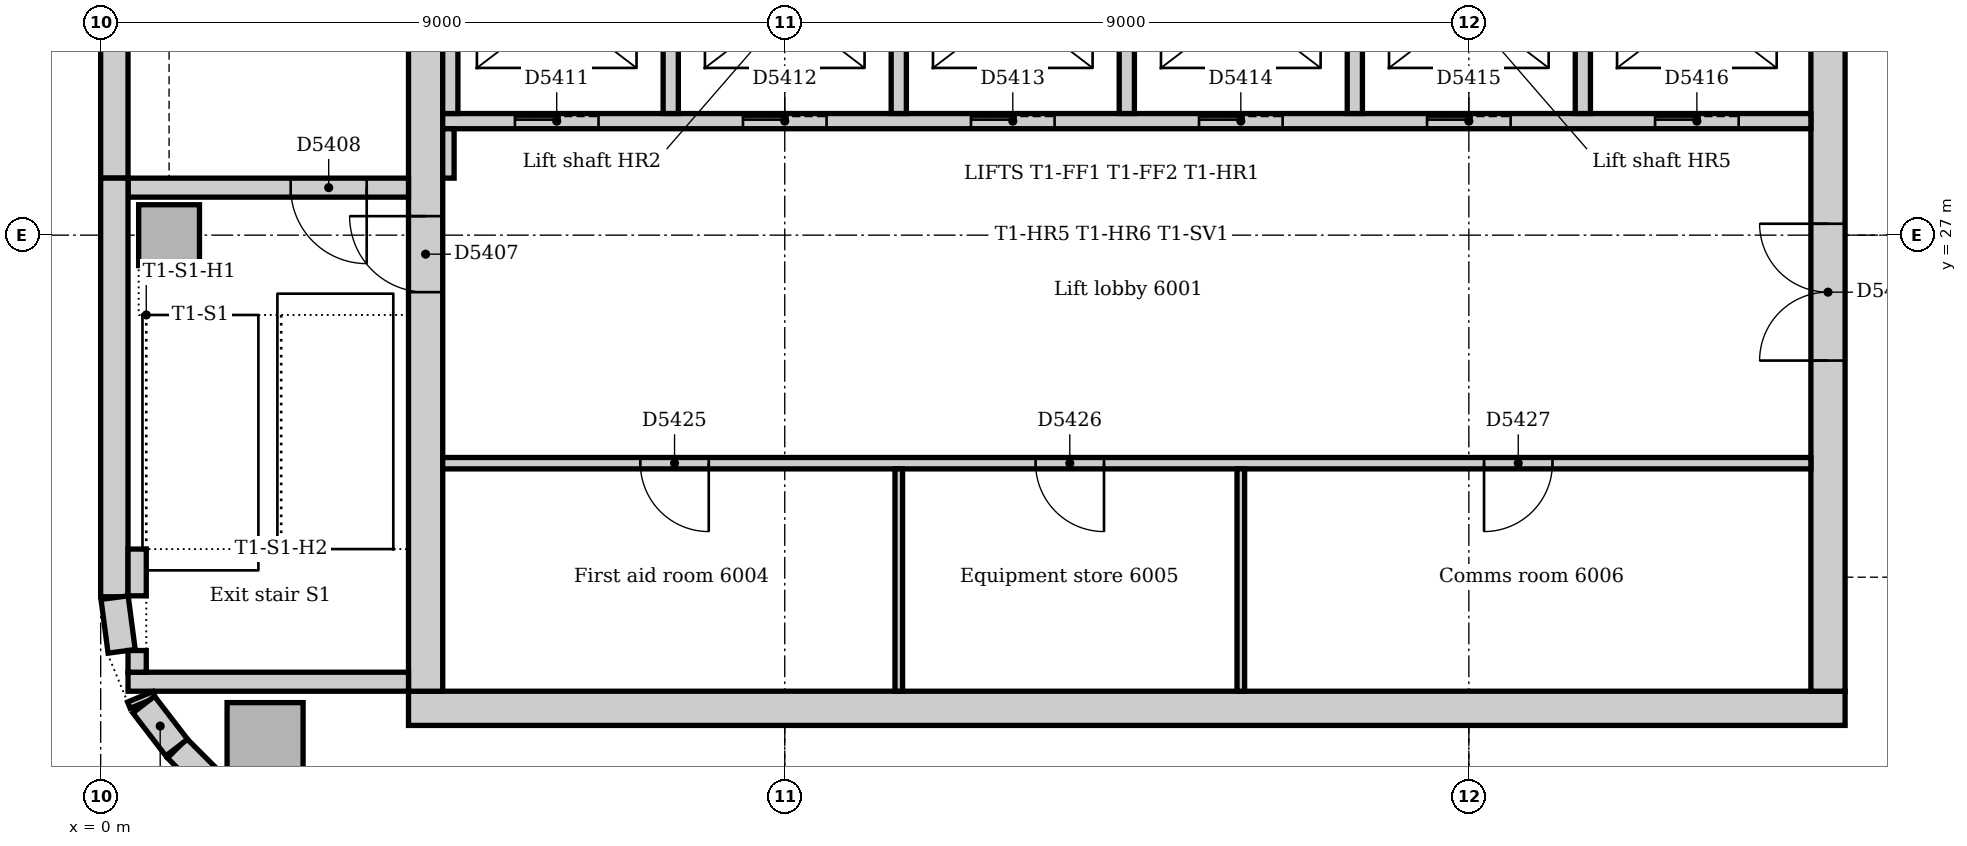
"""IFC4 building model, lengths in metres.
Left out: names, types, materials, properties, quantities, classifications, styles, units other than length and angle.
Written with IfcOpenShell. Run it as: python <this file> out.ifc"""

import sys

from ifc_helpers import new_model, si_unit, direction, frame, frame_2d, origin, origin_2d, place, context, subcontext, project, spatial, rectangle, extrude, element, fill, save


model = new_model("IFC4")
c1 = context("Model", 3, precision=1e-05, world=origin(), true_north=direction((0.0, 1.0)))
c2 = subcontext(c1, "Body", "Model", "MODEL_VIEW")
j1 = project(units=[si_unit("LENGTHUNIT", "METRE"), si_unit("PLANEANGLEUNIT", "RADIAN")], contexts=[c1])
p1 = place(None, origin())
s1 = spatial("IfcSite", under=j1, at=p1, CompositionType="ELEMENT")
p2 = place(p1, origin())
s2 = spatial("IfcBuilding", under=s1, at=p2, CompositionType="ELEMENT")
p3 = place(p2, frame((0.0, 0.0, 251.0)))
s3 = spatial("IfcBuildingStorey", under=s2, at=p3, CompositionType="ELEMENT", Elevation=251.0)
p4 = place(p3, frame((4.05, 20.775, 0.0), z_axis=(0.0, 0.0, 1.0), x_axis=(1.0, 0.0, 0.0)))
e1 = element("IfcWall", 1, at=p4, inside=s3, PredefinedType="SOLIDWALL", context=c2, shape_type="SweptSolid", body=[
    extrude(rectangle(XDim=18.9, YDim=0.45, at=frame_2d((9.45, 0.0))), origin(), (0.0, 0.0, 1.0), 4.0),
])
p5 = place(p3, frame((22.725, 21.0, 0.0), z_axis=(0.0, 0.0, 1.0), x_axis=(0.0, 1.0, 0.0)))
e2 = element("IfcWall", 2, at=p5, inside=s3, PredefinedType="SOLIDWALL", context=c2, shape_type="SweptSolid", body=[
    extrude(rectangle(XDim=10.5, YDim=0.45, at=frame_2d((5.25, 0.0))), origin(), (0.0, 0.0, 1.0), 4.0),
])
p6 = place(p5, frame((4.35, 0.0, 0.0)))
e3 = element("IfcOpeningElement", 3, at=p6, cuts=e2, PredefinedType="OPENING", context=c2, shape_type="SweptSolid", body=[
    extrude(rectangle(XDim=1.8, YDim=2.1, at=frame_2d((0.9, 1.05))), frame((0.0, 0.235, 0.0), z_axis=(0.0, -1.0, 0.0), x_axis=(1.0, 0.0, 0.0)), (0.0, 0.0, 1.0), 0.47),
])
p7 = place(p3, frame((4.275, 31.5, 0.0), z_axis=(0.0, 0.0, 1.0), x_axis=(0.0, -1.0, 0.0)))
e4 = element("IfcWall", 4, at=p7, inside=s3, PredefinedType="SOLIDWALL", context=c2, shape_type="SweptSolid", body=[
    extrude(rectangle(XDim=10.5, YDim=0.45, at=frame_2d((5.25, 0.0))), origin(), (0.0, 0.0, 1.0), 4.0),
])
p8 = place(p7, frame((4.25, 0.0, 0.0)))
e5 = element("IfcOpeningElement", 5, at=p8, cuts=e4, PredefinedType="OPENING", context=c2, shape_type="SweptSolid", body=[
    extrude(rectangle(XDim=1.0, YDim=2.1, at=frame_2d((0.5, 1.05))), frame((0.0, 0.235, 0.0), z_axis=(0.0, -1.0, 0.0), x_axis=(1.0, 0.0, 0.0)), (0.0, 0.0, 1.0), 0.47),
])
p9 = place(p3, frame((0.36, 21.125, 0.0), z_axis=(0.0, 0.0, 1.0), x_axis=(1.0, 0.0, 0.0)))
e6 = element("IfcWall", 6, at=p9, inside=s3, PredefinedType="SOLIDWALL", context=c2, shape_type="SweptSolid", body=[
    extrude(rectangle(XDim=3.69, YDim=0.25, at=frame_2d((1.845, 0.0))), origin(), (0.0, 0.0, 1.0), 4.0),
])
p10 = place(p3, frame((4.05, 27.625, 0.0), z_axis=(0.0, 0.0, 1.0), x_axis=(-1.0, 0.0, 0.0)))
e7 = element("IfcWall", 7, at=p10, inside=s3, PredefinedType="SOLIDWALL", context=c2, shape_type="SweptSolid", body=[
    extrude(rectangle(XDim=3.69, YDim=0.25, at=frame_2d((1.845, 0.0))), origin(), (0.0, 0.0, 1.0), 4.0),
])
p11 = place(p10, frame((0.55, 0.0, 0.0)))
e8 = element("IfcOpeningElement", 8, at=p11, cuts=e7, PredefinedType="OPENING", context=c2, shape_type="SweptSolid", body=[
    extrude(rectangle(XDim=1.0, YDim=2.1, at=frame_2d((0.5, 1.05))), frame((0.0, 0.135, 0.0), z_axis=(0.0, -1.0, 0.0), x_axis=(1.0, 0.0, 0.0)), (0.0, 0.0, 1.0), 0.27),
])
p12 = place(p3, frame((2.163, 20.35, 0.0), z_axis=(0.0, 0.0, 1.0), x_axis=(1.0, 0.0, 0.0)))
e9 = element("IfcColumn", 9, at=p12, inside=s3, PredefinedType="COLUMN", context=c2, shape_type="SweptSolid", body=[
    extrude(rectangle(XDim=1.0, YDim=1.0, at=origin_2d()), origin(), (0.0, 0.0, 1.0), 3.85),
])
p13 = place(p3, frame((0.9, 27.0, 0.0), z_axis=(0.0, 0.0, 1.0), x_axis=(1.0, 0.0, 0.0)))
e10 = element("IfcColumn", 10, at=p13, inside=s3, PredefinedType="COLUMN", context=c2, shape_type="SweptSolid", body=[
    extrude(rectangle(XDim=0.8, YDim=0.8, at=origin_2d()), origin(), (0.0, 0.0, 1.0), 4.0),
])
p14 = place(p3, frame((0.18, 35.25, 0.0), z_axis=(0.0, 0.0, 1.0), x_axis=(0.0, -1.0, 0.0)))
e11 = element("IfcWall", 11, at=p14, inside=s3, PredefinedType="STANDARD", context=c2, shape_type="SweptSolid", body=[
    extrude(rectangle(XDim=7.5, YDim=0.36, at=frame_2d((3.75, 0.0))), origin(), (0.0, 0.0, 1.0), 3.85),
])
p15 = place(p3, frame((0.18, 27.75, 0.0), z_axis=(0.0, 0.0, 1.0), x_axis=(0.0, -1.0, 0.0)))
e12 = element("IfcWall", 12, at=p15, inside=s3, PredefinedType="STANDARD", context=c2, shape_type="SweptSolid", body=[
    extrude(rectangle(XDim=5.507, YDim=0.36, at=frame_2d((2.754, 0.0))), origin(), (0.0, 0.0, 1.0), 3.85),
])
p16 = place(p3, frame((1.006, 20.249, 0.0), z_axis=(0.0, 0.0, 1.0), x_axis=(0.707106781187, -0.707106781187, 0.0)))
e13 = element("IfcWall", 13, at=p16, inside=s3, PredefinedType="STANDARD", context=c2, shape_type="SweptSolid", body=[
    extrude(rectangle(XDim=1.757, YDim=0.36, at=frame_2d((0.879, 0.0))), origin(), (0.0, 0.0, 1.0), 3.85),
])
p17 = place(p3, frame((0.183, 22.231, 0.0), z_axis=(0.0, 0.0, 1.0), x_axis=(0.13055608231, -0.99144092581, 0.0)))
e14 = element("IfcWall", 14, at=p17, inside=s3, PredefinedType="STANDARD", context=c2, shape_type="SweptSolid", body=[
    extrude(rectangle(XDim=0.713, YDim=0.36, at=frame_2d((0.356, 0.0))), origin(), (0.0, 0.0, 1.0), 3.85),
])
p18 = place(p3, frame((0.521, 20.927, 0.0), z_axis=(0.0, 0.0, 1.0), x_axis=(0.382549378284, -0.923935048136, 0.0)))
e15 = element("IfcWall", 15, at=p18, inside=s3, PredefinedType="STANDARD", context=c2, shape_type="SweptSolid", body=[
    extrude(rectangle(XDim=0.089, YDim=0.36, at=frame_2d((0.045, 0.0))), origin(), (0.0, 0.0, 1.0), 3.85),
])
p19 = place(p3, frame((0.566, 20.825, 0.0), z_axis=(0.0, 0.0, 1.0), x_axis=(0.608802368033, -0.793321924995, 0.0)))
e16 = element("IfcWall", 16, at=p19, inside=s3, PredefinedType="STANDARD", context=c2, shape_type="SweptSolid", body=[
    extrude(rectangle(XDim=0.713, YDim=0.36, at=frame_2d((0.357, 0.0))), origin(), (0.0, 0.0, 1.0), 3.85),
])
p20 = place(p3, frame((0.48, 21.25, 0.0), z_axis=(0.0, 0.0, 1.0), x_axis=(0.0, 1.0, 0.0)))
e17 = element("IfcWall", 17, at=p20, inside=s3, PredefinedType="STANDARD", context=c2, shape_type="SweptSolid", body=[
    extrude(rectangle(XDim=0.285, YDim=0.24, at=frame_2d((0.143, 0.0))), origin(), (0.0, 0.0, 1.0), 4.0),
])
p21 = place(p3, frame((0.48, 22.255, 0.0), z_axis=(0.0, 0.0, 1.0), x_axis=(0.0, 1.0, 0.0)))
e18 = element("IfcWall", 18, at=p21, inside=s3, PredefinedType="STANDARD", context=c2, shape_type="SweptSolid", body=[
    extrude(rectangle(XDim=0.615, YDim=0.24, at=frame_2d((0.307, 0.0))), origin(), (0.0, 0.0, 1.0), 4.0),
])
p22 = place(p3, frame((4.5, 28.5, 0.0), z_axis=(0.0, 0.0, 1.0), x_axis=(1.0, 0.0, 0.0)))
e19 = element("IfcWall", 19, at=p22, inside=s3, PredefinedType="PARTITIONING", context=c2, shape_type="SweptSolid", body=[
    extrude(rectangle(XDim=18.0, YDim=0.2, at=frame_2d((9.0, 0.0))), origin(), (0.0, 0.0, 1.0), 3.85),
])
p23 = place(p22, frame((0.95, 0.0, 0.0)))
e20 = element("IfcOpeningElement", 20, at=p23, cuts=e19, PredefinedType="OPENING", context=c2, shape_type="SweptSolid", body=[
    extrude(rectangle(XDim=1.1, YDim=2.1, at=frame_2d((0.55, 1.05))), frame((0.0, 0.11, 0.0), z_axis=(0.0, -1.0, 0.0), x_axis=(1.0, 0.0, 0.0)), (0.0, 0.0, 1.0), 0.22),
])
p24 = place(p22, frame((3.95, 0.0, 0.0)))
e21 = element("IfcOpeningElement", 21, at=p24, cuts=e19, PredefinedType="OPENING", context=c2, shape_type="SweptSolid", body=[
    extrude(rectangle(XDim=1.1, YDim=2.1, at=frame_2d((0.55, 1.05))), frame((0.0, 0.11, 0.0), z_axis=(0.0, -1.0, 0.0), x_axis=(1.0, 0.0, 0.0)), (0.0, 0.0, 1.0), 0.22),
])
p25 = place(p22, frame((6.95, 0.0, 0.0)))
e22 = element("IfcOpeningElement", 22, at=p25, cuts=e19, PredefinedType="OPENING", context=c2, shape_type="SweptSolid", body=[
    extrude(rectangle(XDim=1.1, YDim=2.1, at=frame_2d((0.55, 1.05))), frame((0.0, 0.11, 0.0), z_axis=(0.0, -1.0, 0.0), x_axis=(1.0, 0.0, 0.0)), (0.0, 0.0, 1.0), 0.22),
])
p26 = place(p22, frame((9.95, 0.0, 0.0)))
e23 = element("IfcOpeningElement", 23, at=p26, cuts=e19, PredefinedType="OPENING", context=c2, shape_type="SweptSolid", body=[
    extrude(rectangle(XDim=1.1, YDim=2.1, at=frame_2d((0.55, 1.05))), frame((0.0, 0.11, 0.0), z_axis=(0.0, -1.0, 0.0), x_axis=(1.0, 0.0, 0.0)), (0.0, 0.0, 1.0), 0.22),
])
p27 = place(p22, frame((12.95, 0.0, 0.0)))
e24 = element("IfcOpeningElement", 24, at=p27, cuts=e19, PredefinedType="OPENING", context=c2, shape_type="SweptSolid", body=[
    extrude(rectangle(XDim=1.1, YDim=2.1, at=frame_2d((0.55, 1.05))), frame((0.0, 0.11, 0.0), z_axis=(0.0, -1.0, 0.0), x_axis=(1.0, 0.0, 0.0)), (0.0, 0.0, 1.0), 0.22),
])
p28 = place(p22, frame((15.95, 0.0, 0.0)))
e25 = element("IfcOpeningElement", 25, at=p28, cuts=e19, PredefinedType="OPENING", context=c2, shape_type="SweptSolid", body=[
    extrude(rectangle(XDim=1.1, YDim=2.1, at=frame_2d((0.55, 1.05))), frame((0.0, 0.11, 0.0), z_axis=(0.0, -1.0, 0.0), x_axis=(1.0, 0.0, 0.0)), (0.0, 0.0, 1.0), 0.22),
])
for number, where, z_axis, x_axis in (
    (26, (10.5, 28.6, 0.0), (0.0, 0.0, 1.0), (0.0, 1.0, 0.0)),
    (27, (13.5, 28.6, 0.0), (0.0, 0.0, 1.0), (0.0, 1.0, 0.0)),
    (28, (16.5, 28.6, 0.0), (0.0, 0.0, 1.0), (0.0, 1.0, 0.0)),
    (29, (19.5, 28.6, 0.0), (0.0, 0.0, 1.0), (0.0, 1.0, 0.0)),
    (30, (4.6, 28.6, 0.0), (0.0, 0.0, 1.0), (0.0, 1.0, 0.0)),
    (31, (7.5, 28.6, 0.0), (0.0, 0.0, 1.0), (0.0, 1.0, 0.0)),
):
    element("IfcWall", number, at=place(p3, frame(where, z_axis=z_axis, x_axis=x_axis)), inside=s3, PredefinedType="PARTITIONING", context=c2, shape_type="SweptSolid", body=[
        extrude(rectangle(XDim=2.65, YDim=0.2, at=frame_2d((1.325, 0.0))), origin(), (0.0, 0.0, 1.0), 3.85),
    ])
p29 = place(p3, frame((4.5, 24.0, 0.0), z_axis=(0.0, 0.0, 1.0), x_axis=(1.0, 0.0, 0.0)))
e32 = element("IfcWall", 32, at=p29, inside=s3, PredefinedType="PARTITIONING", context=c2, shape_type="SweptSolid", body=[
    extrude(rectangle(XDim=18.0, YDim=0.15, at=frame_2d((9.0, 0.0))), origin(), (0.0, 0.0, 1.0), 3.85),
])
p30 = place(p29, frame((2.6, 0.0, 0.0)))
e33 = element("IfcOpeningElement", 33, at=p30, cuts=e32, PredefinedType="OPENING", context=c2, shape_type="SweptSolid", body=[
    extrude(rectangle(XDim=0.9, YDim=2.1, at=frame_2d((0.45, 1.05))), frame((0.0, 0.085, 0.0), z_axis=(0.0, -1.0, 0.0), x_axis=(1.0, 0.0, 0.0)), (0.0, 0.0, 1.0), 0.17),
])
p31 = place(p29, frame((7.8, 0.0, 0.0)))
e34 = element("IfcOpeningElement", 34, at=p31, cuts=e32, PredefinedType="OPENING", context=c2, shape_type="SweptSolid", body=[
    extrude(rectangle(XDim=0.9, YDim=2.1, at=frame_2d((0.45, 1.05))), frame((0.0, 0.085, 0.0), z_axis=(0.0, -1.0, 0.0), x_axis=(1.0, 0.0, 0.0)), (0.0, 0.0, 1.0), 0.17),
])
p32 = place(p29, frame((13.7, 0.0, 0.0)))
e35 = element("IfcOpeningElement", 35, at=p32, cuts=e32, PredefinedType="OPENING", context=c2, shape_type="SweptSolid", body=[
    extrude(rectangle(XDim=0.9, YDim=2.1, at=frame_2d((0.45, 1.05))), frame((0.0, 0.085, 0.0), z_axis=(0.0, -1.0, 0.0), x_axis=(1.0, 0.0, 0.0)), (0.0, 0.0, 1.0), 0.17),
])
p33 = place(p3, frame((4.575, 27.75, 0.0), z_axis=(0.0, 0.0, 1.0), x_axis=(0.0, 1.0, 0.0)))
e36 = element("IfcWall", 36, at=p33, inside=s3, PredefinedType="PARTITIONING", context=c2, shape_type="SweptSolid", body=[
    extrude(rectangle(XDim=0.65, YDim=0.15, at=frame_2d((0.325, 0.0))), origin(), (0.0, 0.0, 1.0), 3.85),
])
for number, where, z_axis, x_axis in (
    (37, (10.5, 21.0, 0.0), (0.0, 0.0, 1.0), (0.0, 1.0, 0.0)),
    (38, (15.0, 21.0, 0.0), (0.0, 0.0, 1.0), (0.0, 1.0, 0.0)),
):
    element("IfcWall", number, at=place(p3, frame(where, z_axis=z_axis, x_axis=x_axis)), inside=s3, PredefinedType="PARTITIONING", context=c2, shape_type="SweptSolid", body=[
        extrude(rectangle(XDim=2.925, YDim=0.1, at=frame_2d((1.462, 0.0))), origin(), (0.0, 0.0, 1.0), 3.85),
    ])
p34 = place(p8, frame((1.0, 0.0, 0.0), z_axis=(0.0, 0.0, 1.0), x_axis=(-1.0, 0.0, 0.0)))
e39 = element("IfcDoor", 39, at=p34, inside=s3, OperationType="SINGLE_SWING_RIGHT", PredefinedType="DOOR", context=c2, shape_type="SweptSolid", body=[
    extrude(rectangle(XDim=1.0, YDim=2.1, at=frame_2d((0.5, 1.05))), frame((0.0, 0.025, 0.0), z_axis=(0.0, -1.0, 0.0), x_axis=(1.0, 0.0, 0.0)), (0.0, 0.0, 1.0), 0.05),
])
fill(e5, e39)
p35 = place(p11, origin())
e40 = element("IfcDoor", 40, at=p35, inside=s3, OperationType="SINGLE_SWING_LEFT", PredefinedType="DOOR", context=c2, shape_type="SweptSolid", body=[
    extrude(rectangle(XDim=1.0, YDim=2.1, at=frame_2d((0.5, 1.05))), frame((0.0, 0.025, 0.0), z_axis=(0.0, -1.0, 0.0), x_axis=(1.0, 0.0, 0.0)), (0.0, 0.0, 1.0), 0.05),
])
fill(e8, e40)
p36 = place(p23, origin())
e41 = element("IfcDoor", 41, at=p36, inside=s3, OperationType="SLIDING_TO_LEFT", PredefinedType="DOOR", context=c2, shape_type="SweptSolid", body=[
    extrude(rectangle(XDim=1.1, YDim=2.1, at=frame_2d((0.55, 1.05))), frame((0.0, 0.025, 0.0), z_axis=(0.0, -1.0, 0.0), x_axis=(1.0, 0.0, 0.0)), (0.0, 0.0, 1.0), 0.05),
])
fill(e20, e41)
p37 = place(p24, origin())
e42 = element("IfcDoor", 42, at=p37, inside=s3, OperationType="SLIDING_TO_LEFT", PredefinedType="DOOR", context=c2, shape_type="SweptSolid", body=[
    extrude(rectangle(XDim=1.1, YDim=2.1, at=frame_2d((0.55, 1.05))), frame((0.0, 0.025, 0.0), z_axis=(0.0, -1.0, 0.0), x_axis=(1.0, 0.0, 0.0)), (0.0, 0.0, 1.0), 0.05),
])
fill(e21, e42)
p38 = place(p25, origin())
e43 = element("IfcDoor", 43, at=p38, inside=s3, OperationType="SLIDING_TO_LEFT", PredefinedType="DOOR", context=c2, shape_type="SweptSolid", body=[
    extrude(rectangle(XDim=1.1, YDim=2.1, at=frame_2d((0.55, 1.05))), frame((0.0, 0.025, 0.0), z_axis=(0.0, -1.0, 0.0), x_axis=(1.0, 0.0, 0.0)), (0.0, 0.0, 1.0), 0.05),
])
fill(e22, e43)
p39 = place(p26, origin())
e44 = element("IfcDoor", 44, at=p39, inside=s3, OperationType="SLIDING_TO_LEFT", PredefinedType="DOOR", context=c2, shape_type="SweptSolid", body=[
    extrude(rectangle(XDim=1.1, YDim=2.1, at=frame_2d((0.55, 1.05))), frame((0.0, 0.025, 0.0), z_axis=(0.0, -1.0, 0.0), x_axis=(1.0, 0.0, 0.0)), (0.0, 0.0, 1.0), 0.05),
])
fill(e23, e44)
p40 = place(p27, origin())
e45 = element("IfcDoor", 45, at=p40, inside=s3, OperationType="SLIDING_TO_LEFT", PredefinedType="DOOR", context=c2, shape_type="SweptSolid", body=[
    extrude(rectangle(XDim=1.1, YDim=2.1, at=frame_2d((0.55, 1.05))), frame((0.0, 0.025, 0.0), z_axis=(0.0, -1.0, 0.0), x_axis=(1.0, 0.0, 0.0)), (0.0, 0.0, 1.0), 0.05),
])
fill(e24, e45)
p41 = place(p28, origin())
e46 = element("IfcDoor", 46, at=p41, inside=s3, OperationType="SLIDING_TO_LEFT", PredefinedType="DOOR", context=c2, shape_type="SweptSolid", body=[
    extrude(rectangle(XDim=1.1, YDim=2.1, at=frame_2d((0.55, 1.05))), frame((0.0, 0.025, 0.0), z_axis=(0.0, -1.0, 0.0), x_axis=(1.0, 0.0, 0.0)), (0.0, 0.0, 1.0), 0.05),
])
fill(e25, e46)
p42 = place(p6, origin())
e47 = element("IfcDoor", 47, at=p42, inside=s3, OperationType="DOUBLE_DOOR_DOUBLE_SWING", PredefinedType="DOOR", context=c2, shape_type="SweptSolid", body=[
    extrude(rectangle(XDim=1.8, YDim=2.1, at=frame_2d((0.9, 1.05))), frame((0.0, 0.025, 0.0), z_axis=(0.0, -1.0, 0.0), x_axis=(1.0, 0.0, 0.0)), (0.0, 0.0, 1.0), 0.05),
])
fill(e3, e47)
p43 = place(p30, frame((0.9, 0.0, 0.0), z_axis=(0.0, 0.0, 1.0), x_axis=(-1.0, 0.0, 0.0)))
e48 = element("IfcDoor", 48, at=p43, inside=s3, OperationType="SINGLE_SWING_LEFT", PredefinedType="DOOR", context=c2, shape_type="SweptSolid", body=[
    extrude(rectangle(XDim=0.9, YDim=2.1, at=frame_2d((0.45, 1.05))), frame((0.0, 0.025, 0.0), z_axis=(0.0, -1.0, 0.0), x_axis=(1.0, 0.0, 0.0)), (0.0, 0.0, 1.0), 0.05),
])
fill(e33, e48)
p44 = place(p31, frame((0.9, 0.0, 0.0), z_axis=(0.0, 0.0, 1.0), x_axis=(-1.0, 0.0, 0.0)))
e49 = element("IfcDoor", 49, at=p44, inside=s3, OperationType="SINGLE_SWING_LEFT", PredefinedType="DOOR", context=c2, shape_type="SweptSolid", body=[
    extrude(rectangle(XDim=0.9, YDim=2.1, at=frame_2d((0.45, 1.05))), frame((0.0, 0.025, 0.0), z_axis=(0.0, -1.0, 0.0), x_axis=(1.0, 0.0, 0.0)), (0.0, 0.0, 1.0), 0.05),
])
fill(e34, e49)
p45 = place(p32, frame((0.9, 0.0, 0.0), z_axis=(0.0, 0.0, 1.0), x_axis=(-1.0, 0.0, 0.0)))
e50 = element("IfcDoor", 50, at=p45, inside=s3, OperationType="SINGLE_SWING_RIGHT", PredefinedType="DOOR", context=c2, shape_type="SweptSolid", body=[
    extrude(rectangle(XDim=0.9, YDim=2.1, at=frame_2d((0.45, 1.05))), frame((0.0, 0.025, 0.0), z_axis=(0.0, -1.0, 0.0), x_axis=(1.0, 0.0, 0.0)), (0.0, 0.0, 1.0), 0.05),
])
fill(e35, e50)
save(model, sys.argv[1])
